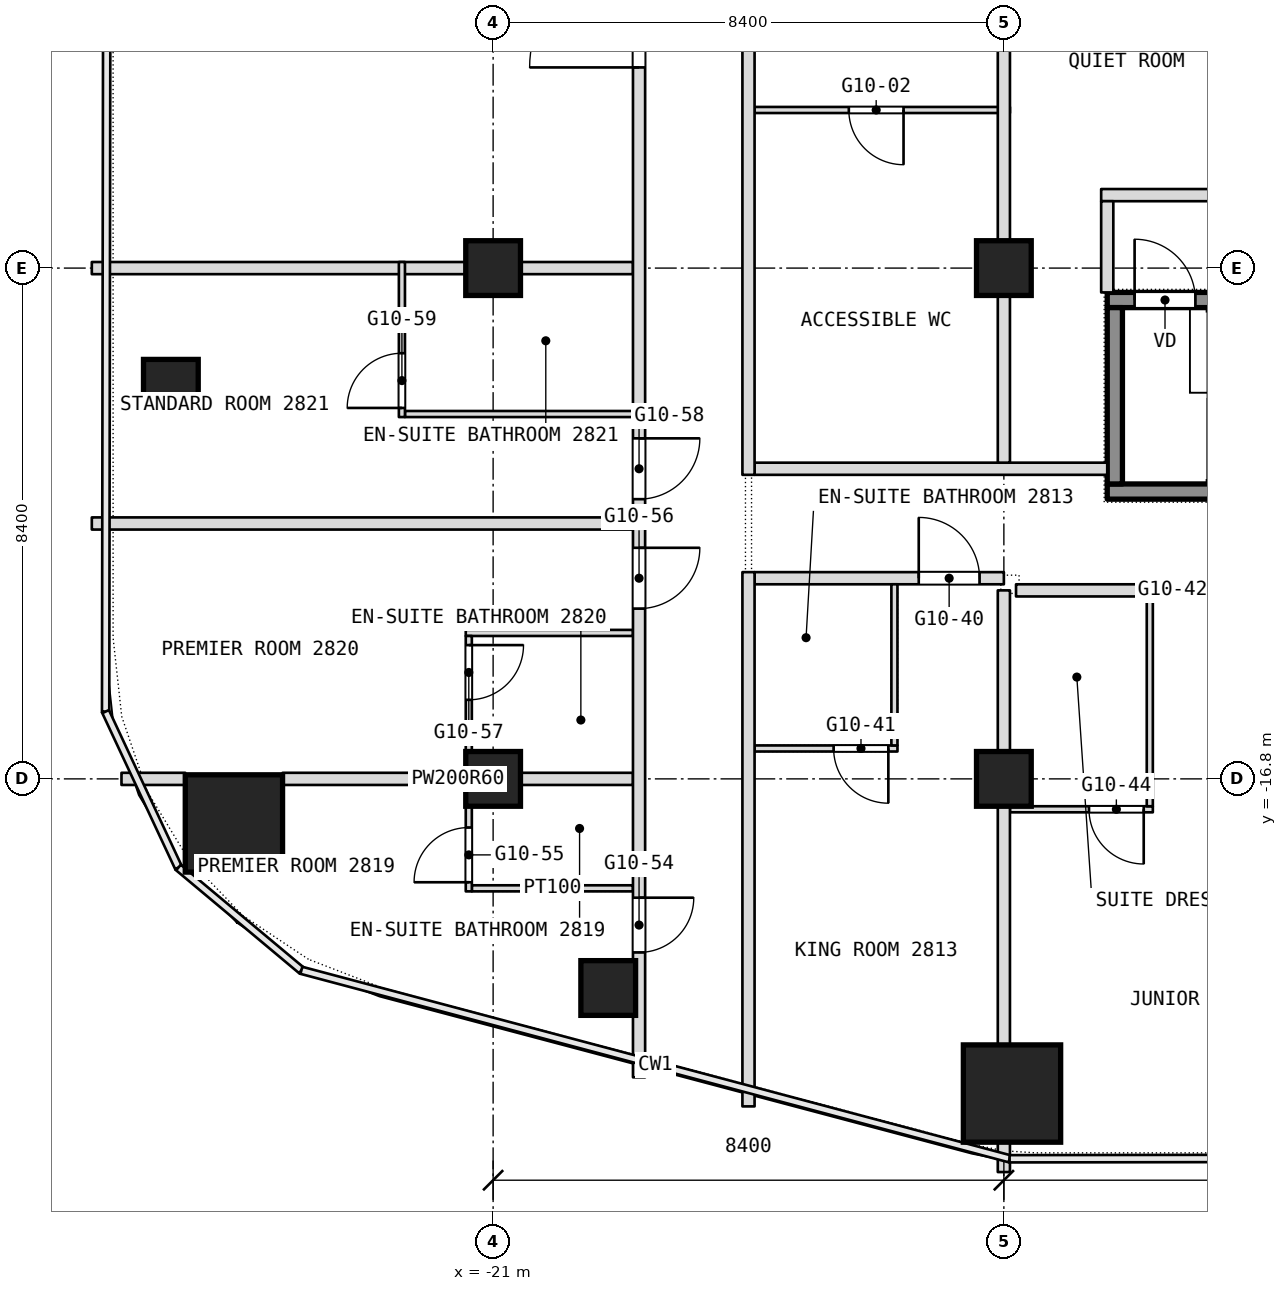
"""IFC4 building model, lengths in metres.
Left out: names, types, materials, properties, quantities, classifications, styles, units other than length and angle.
Written with IfcOpenShell. Run it as: python <this file> out.ifc"""

import sys

from ifc_helpers import new_model, si_unit, direction, frame, frame_2d, origin, origin_2d, place, context, subcontext, project, spatial, rectangle, extrude, element, fill, save


model = new_model("IFC4")
c1 = context("Model", 3, precision=1e-05, world=origin(), true_north=direction((0.0, 1.0)))
c2 = subcontext(c1, "Body", "Model", "MODEL_VIEW")
j1 = project(units=[si_unit("LENGTHUNIT", "METRE"), si_unit("PLANEANGLEUNIT", "RADIAN")], contexts=[c1])
p1 = place(None, origin())
s1 = spatial("IfcSite", under=j1, at=p1, CompositionType="ELEMENT")
p2 = place(p1, origin())
s2 = spatial("IfcBuilding", under=s1, at=p2, CompositionType="ELEMENT")
p3 = place(p2, frame((0.0, 0.0, 126.5)))
s3 = spatial("IfcBuildingStorey", under=s2, at=p3, CompositionType="ELEMENT", Elevation=126.5)
for number, where, z_axis, x_axis in (
    (1, (-25.263, -17.533, 0.0), (0.0, 0.0, 1.0), (1.0, 0.0, 0.0)),
    (2, (-12.466, -21.975, 0.0), (0.0, 0.0, 1.0), (1.0, 0.0, 0.0)),
):
    element("IfcColumn", number, at=place(p3, frame(where, z_axis=z_axis, x_axis=x_axis)), inside=s3, PredefinedType="COLUMN", context=c2, shape_type="SweptSolid", body=[
        extrude(rectangle(XDim=1.6, YDim=1.6, at=origin_2d()), origin(), (0.0, 0.0, 1.0), 3.6),
    ])
for number, where, z_axis, x_axis in (
    (3, (-21.0, -16.8, 0.0), (0.0, 0.0, 1.0), (1.0, 0.0, 0.0)),
    (4, (-21.0, -8.4, 0.0), (0.0, 0.0, 1.0), (1.0, 0.0, 0.0)),
    (5, (-12.6, -16.8, 0.0), (0.0, 0.0, 1.0), (1.0, 0.0, 0.0)),
    (6, (-12.6, -8.4, 0.0), (0.0, 0.0, 1.0), (1.0, 0.0, 0.0)),
    (7, (-26.3, -10.352, 0.0), (0.0, 0.0, 1.0), (1.0, 0.0, 0.0)),
    (8, (-19.107, -20.239, 0.0), (0.0, 0.0, 1.0), (1.0, 0.0, 0.0)),
):
    element("IfcColumn", number, at=place(p3, frame(where, z_axis=z_axis, x_axis=x_axis)), inside=s3, PredefinedType="COLUMN", context=c2, shape_type="SweptSolid", body=[
        extrude(rectangle(XDim=0.9, YDim=0.9, at=origin_2d()), origin(), (0.0, 0.0, 1.0), 3.6),
    ])
p4 = place(p3, frame((-21.35, -18.6, 0.0), z_axis=(0.0, 0.0, 1.0), x_axis=(1.0, 0.0, 0.0)))
e9 = element("IfcWall", 9, at=p4, inside=s3, PredefinedType="PARTITIONING", context=c2, shape_type="SweptSolid", body=[
    extrude(rectangle(XDim=2.65, YDim=0.1, at=frame_2d((1.325, 0.0))), origin(), (0.0, 0.0, 1.0), 3.34),
])
p5 = place(p3, frame((-12.5, -17.3, 0.0), z_axis=(0.0, 0.0, 1.0), x_axis=(1.0, 0.0, 0.0)))
e10 = element("IfcWall", 10, at=p5, inside=s3, PredefinedType="PARTITIONING", context=c2, shape_type="SweptSolid", body=[
    extrude(rectangle(XDim=2.35, YDim=0.1, at=frame_2d((1.175, 0.0))), origin(), (0.0, 0.0, 1.0), 3.34),
])
p6 = place(p5, frame((1.3, 0.0, 0.0)))
e11 = element("IfcOpeningElement", 11, at=p6, cuts=e10, PredefinedType="OPENING", context=c2, shape_type="SweptSolid", body=[
    extrude(rectangle(XDim=0.9, YDim=2.1, at=frame_2d((0.45, 1.05))), frame((0.0, 0.05, 0.0), z_axis=(0.0, -1.0, 0.0), x_axis=(1.0, 0.0, 0.0)), (0.0, 0.0, 1.0), 0.1),
])
p7 = place(p3, frame((-27.112, -16.8, 0.0), z_axis=(0.0, 0.0, 1.0), x_axis=(1.0, 0.0, 0.0)))
e12 = element("IfcWall", 12, at=p7, inside=s3, PredefinedType="PARTITIONING", context=c2, shape_type="SweptSolid", body=[
    extrude(rectangle(XDim=1.049, YDim=0.2, at=frame_2d((0.524, 0.0))), origin(), (0.0, 0.0, 1.0), 3.34),
])
p8 = place(p3, frame((-24.463, -16.8, 0.0), z_axis=(0.0, 0.0, 1.0), x_axis=(1.0, 0.0, 0.0)))
e13 = element("IfcWall", 13, at=p8, inside=s3, PredefinedType="PARTITIONING", context=c2, shape_type="SweptSolid", body=[
    extrude(rectangle(XDim=5.763, YDim=0.2, at=frame_2d((2.881, 0.0))), origin(), (0.0, 0.0, 1.0), 2.89),
])
p9 = place(p3, frame((-16.7, -16.3, 0.0), z_axis=(0.0, 0.0, 1.0), x_axis=(1.0, 0.0, 0.0)))
e14 = element("IfcWall", 14, at=p9, inside=s3, PredefinedType="PARTITIONING", context=c2, shape_type="SweptSolid", body=[
    extrude(rectangle(XDim=2.35, YDim=0.1, at=frame_2d((1.175, 0.0))), origin(), (0.0, 0.0, 1.0), 3.34),
])
p10 = place(p9, frame((1.3, 0.0, 0.0)))
e15 = element("IfcOpeningElement", 15, at=p10, cuts=e14, PredefinedType="OPENING", context=c2, shape_type="SweptSolid", body=[
    extrude(rectangle(XDim=0.9, YDim=2.1, at=frame_2d((0.45, 1.05))), frame((0.0, 0.05, 0.0), z_axis=(0.0, -1.0, 0.0), x_axis=(1.0, 0.0, 0.0)), (0.0, 0.0, 1.0), 0.1),
])
p11 = place(p3, frame((-21.45, -14.4, 0.0), z_axis=(0.0, 0.0, 1.0), x_axis=(1.0, 0.0, 0.0)))
e16 = element("IfcWall", 16, at=p11, inside=s3, PredefinedType="PARTITIONING", context=c2, shape_type="SweptSolid", body=[
    extrude(rectangle(XDim=2.75, YDim=0.1, at=frame_2d((1.375, 0.0))), origin(), (0.0, 0.0, 1.0), 3.34),
])
p12 = place(p3, frame((-12.4, -13.7, 0.0), z_axis=(0.0, 0.0, 1.0), x_axis=(1.0, 0.0, 0.0)))
e17 = element("IfcWall", 17, at=p12, inside=s3, PredefinedType="PARTITIONING", context=c2, shape_type="SweptSolid", body=[
    extrude(rectangle(XDim=9.2, YDim=0.2, at=frame_2d((4.6, 0.0))), origin(), (0.0, 0.0, 1.0), 3.34),
])
p13 = place(p12, frame((3.4, 0.0, 0.0)))
e18 = element("IfcOpeningElement", 18, at=p13, cuts=e17, PredefinedType="OPENING", context=c2, shape_type="SweptSolid", body=[
    extrude(rectangle(XDim=1.1, YDim=2.1, at=frame_2d((0.55, 1.05))), frame((0.0, 0.1, 0.0), z_axis=(0.0, -1.0, 0.0), x_axis=(1.0, 0.0, 0.0)), (0.0, 0.0, 1.0), 0.2),
])
p14 = place(p3, frame((-16.7, -13.5, 0.0), z_axis=(0.0, 0.0, 1.0), x_axis=(1.0, 0.0, 0.0)))
e19 = element("IfcWall", 19, at=p14, inside=s3, PredefinedType="PARTITIONING", context=c2, shape_type="SweptSolid", body=[
    extrude(rectangle(XDim=4.1, YDim=0.2, at=frame_2d((2.05, 0.0))), origin(), (0.0, 0.0, 1.0), 3.34),
])
p15 = place(p14, frame((2.7, 0.0, 0.0)))
e20 = element("IfcOpeningElement", 20, at=p15, cuts=e19, PredefinedType="OPENING", context=c2, shape_type="SweptSolid", body=[
    extrude(rectangle(XDim=1.0, YDim=2.1, at=frame_2d((0.5, 1.05))), frame((0.0, 0.1, 0.0), z_axis=(0.0, -1.0, 0.0), x_axis=(1.0, 0.0, 0.0)), (0.0, 0.0, 1.0), 0.2),
])
p16 = place(p3, frame((-27.6, -12.6, 0.0), z_axis=(0.0, 0.0, 1.0), x_axis=(1.0, 0.0, 0.0)))
e21 = element("IfcWall", 21, at=p16, inside=s3, PredefinedType="PARTITIONING", context=c2, shape_type="SweptSolid", body=[
    extrude(rectangle(XDim=8.9, YDim=0.2, at=frame_2d((4.45, 0.0))), origin(), (0.0, 0.0, 1.0), 3.34),
])
p17 = place(p3, frame((-16.7, -11.7, 0.0), z_axis=(0.0, 0.0, 1.0), x_axis=(1.0, 0.0, 0.0)))
e22 = element("IfcWall", 22, at=p17, inside=s3, PredefinedType="PARTITIONING", context=c2, shape_type="SweptSolid", body=[
    extrude(rectangle(XDim=5.8, YDim=0.2, at=frame_2d((2.9, 0.0))), origin(), (0.0, 0.0, 1.0), 3.34),
])
p18 = place(p3, frame((-22.45, -10.8, 0.0), z_axis=(0.0, 0.0, 1.0), x_axis=(1.0, 0.0, 0.0)))
e23 = element("IfcWall", 23, at=p18, inside=s3, PredefinedType="PARTITIONING", context=c2, shape_type="SweptSolid", body=[
    extrude(rectangle(XDim=3.75, YDim=0.1, at=frame_2d((1.875, 0.0))), origin(), (0.0, 0.0, 1.0), 3.34),
])
p19 = place(p3, frame((-27.6, -8.4, 0.0), z_axis=(0.0, 0.0, 1.0), x_axis=(1.0, 0.0, 0.0)))
e24 = element("IfcWall", 24, at=p19, inside=s3, PredefinedType="PARTITIONING", context=c2, shape_type="SweptSolid", body=[
    extrude(rectangle(XDim=8.9, YDim=0.2, at=frame_2d((4.45, 0.0))), origin(), (0.0, 0.0, 1.0), 2.89),
])
p20 = place(p3, frame((-11.0, -7.2, 0.0), z_axis=(0.0, 0.0, 1.0), x_axis=(1.0, 0.0, 0.0)))
e25 = element("IfcWall", 25, at=p20, inside=s3, PredefinedType="PARTITIONING", context=c2, shape_type="SweptSolid", body=[
    extrude(rectangle(XDim=2.3, YDim=0.2, at=frame_2d((1.15, 0.0))), origin(), (0.0, 0.0, 1.0), 3.34),
])
p21 = place(p3, frame((-16.7, -5.8, 0.0), z_axis=(0.0, 0.0, 1.0), x_axis=(1.0, 0.0, 0.0)))
e26 = element("IfcWall", 26, at=p21, inside=s3, PredefinedType="PARTITIONING", context=c2, shape_type="SweptSolid", body=[
    extrude(rectangle(XDim=4.2, YDim=0.1, at=frame_2d((2.1, 0.0))), origin(), (0.0, 0.0, 1.0), 3.34),
])
p22 = place(p21, frame((1.55, 0.0, 0.0)))
e27 = element("IfcOpeningElement", 27, at=p22, cuts=e26, PredefinedType="OPENING", context=c2, shape_type="SweptSolid", body=[
    extrude(rectangle(XDim=0.9, YDim=2.1, at=frame_2d((0.45, 1.05))), frame((0.0, 0.05, 0.0), z_axis=(0.0, -1.0, 0.0), x_axis=(1.0, 0.0, 0.0)), (0.0, 0.0, 1.0), 0.1),
])
p23 = place(p3, frame((-10.2, -17.25, 0.0), z_axis=(0.0, 0.0, 1.0), x_axis=(0.0, 1.0, 0.0)))
e28 = element("IfcWall", 28, at=p23, inside=s3, PredefinedType="PARTITIONING", context=c2, shape_type="SweptSolid", body=[
    extrude(rectangle(XDim=3.45, YDim=0.1, at=frame_2d((1.725, 0.0))), origin(), (0.0, 0.0, 1.0), 3.34),
])
p24 = place(p3, frame((-10.9, -8.8, 0.0), z_axis=(0.0, 0.0, 1.0), x_axis=(0.0, 1.0, 0.0)))
e29 = element("IfcWall", 29, at=p24, inside=s3, PredefinedType="PARTITIONING", context=c2, shape_type="SweptSolid", body=[
    extrude(rectangle(XDim=1.5, YDim=0.2, at=frame_2d((0.75, 0.0))), origin(), (0.0, 0.0, 1.0), 3.34),
])
p25 = place(p3, frame((-12.6, -23.266, 0.0), z_axis=(0.0, 0.0, 1.0), x_axis=(0.0, 1.0, 0.0)))
e30 = element("IfcWall", 30, at=p25, inside=s3, PredefinedType="PARTITIONING", context=c2, shape_type="SweptSolid", body=[
    extrude(rectangle(XDim=0.491, YDim=0.2, at=frame_2d((0.246, 0.0))), origin(), (0.0, 0.0, 1.0), 3.34),
])
p26 = place(p3, frame((-12.6, -21.175, 0.0), z_axis=(0.0, 0.0, 1.0), x_axis=(0.0, 1.0, 0.0)))
e31 = element("IfcWall", 31, at=p26, inside=s3, PredefinedType="PARTITIONING", context=c2, shape_type="SweptSolid", body=[
    extrude(rectangle(XDim=7.475, YDim=0.2, at=frame_2d((3.738, 0.0))), origin(), (0.0, 0.0, 1.0), 3.34),
])
p27 = place(p3, frame((-12.6, -11.6, 0.0), z_axis=(0.0, 0.0, 1.0), x_axis=(0.0, 1.0, 0.0)))
e32 = element("IfcWall", 32, at=p27, inside=s3, PredefinedType="PARTITIONING", context=c2, shape_type="SweptSolid", body=[
    extrude(rectangle(XDim=9.7, YDim=0.2, at=frame_2d((4.85, 0.0))), origin(), (0.0, 0.0, 1.0), 3.34),
])
p28 = place(p3, frame((-14.4, -16.25, 0.0), z_axis=(0.0, 0.0, 1.0), x_axis=(0.0, 1.0, 0.0)))
e33 = element("IfcWall", 33, at=p28, inside=s3, PredefinedType="PARTITIONING", context=c2, shape_type="SweptSolid", body=[
    extrude(rectangle(XDim=2.65, YDim=0.1, at=frame_2d((1.325, 0.0))), origin(), (0.0, 0.0, 1.0), 3.34),
])
p29 = place(p3, frame((-16.8, -22.186, 0.0), z_axis=(0.0, 0.0, 1.0), x_axis=(0.0, 1.0, 0.0)))
e34 = element("IfcWall", 34, at=p29, inside=s3, PredefinedType="PARTITIONING", context=c2, shape_type="SweptSolid", body=[
    extrude(rectangle(XDim=8.786, YDim=0.2, at=frame_2d((4.393, 0.0))), origin(), (0.0, 0.0, 1.0), 3.34),
])
p30 = place(p3, frame((-16.8, -11.8, 0.0), z_axis=(0.0, 0.0, 1.0), x_axis=(0.0, 1.0, 0.0)))
e35 = element("IfcWall", 35, at=p30, inside=s3, PredefinedType="PARTITIONING", context=c2, shape_type="SweptSolid", body=[
    extrude(rectangle(XDim=9.9, YDim=0.2, at=frame_2d((4.95, 0.0))), origin(), (0.0, 0.0, 1.0), 3.34),
])
p31 = place(p3, frame((-18.6, -21.708, 0.0), z_axis=(0.0, 0.0, 1.0), x_axis=(0.0, 1.0, 0.0)))
e36 = element("IfcWall", 36, at=p31, inside=s3, PredefinedType="PARTITIONING", context=c2, shape_type="SweptSolid", body=[
    extrude(rectangle(XDim=28.608, YDim=0.2, at=frame_2d((14.304, 0.0))), origin(), (0.0, 0.0, 1.0), 3.34),
])
p32 = place(p31, frame((2.054, 0.0, 0.0)))
e37 = element("IfcOpeningElement", 37, at=p32, cuts=e36, PredefinedType="OPENING", context=c2, shape_type="SweptSolid", body=[
    extrude(rectangle(XDim=0.9, YDim=2.1, at=frame_2d((0.45, 1.05))), frame((0.0, 0.1, 0.0), z_axis=(0.0, -1.0, 0.0), x_axis=(1.0, 0.0, 0.0)), (0.0, 0.0, 1.0), 0.2),
])
p33 = place(p31, frame((7.708, 0.0, 0.0)))
e38 = element("IfcOpeningElement", 38, at=p33, cuts=e36, PredefinedType="OPENING", context=c2, shape_type="SweptSolid", body=[
    extrude(rectangle(XDim=1.0, YDim=2.1, at=frame_2d((0.5, 1.05))), frame((0.0, 0.1, 0.0), z_axis=(0.0, -1.0, 0.0), x_axis=(1.0, 0.0, 0.0)), (0.0, 0.0, 1.0), 0.2),
])
p34 = place(p31, frame((9.508, 0.0, 0.0)))
e39 = element("IfcOpeningElement", 39, at=p34, cuts=e36, PredefinedType="OPENING", context=c2, shape_type="SweptSolid", body=[
    extrude(rectangle(XDim=1.0, YDim=2.1, at=frame_2d((0.5, 1.05))), frame((0.0, 0.1, 0.0), z_axis=(0.0, -1.0, 0.0), x_axis=(1.0, 0.0, 0.0)), (0.0, 0.0, 1.0), 0.2),
])
p35 = place(p31, frame((16.608, 0.0, 0.0)))
e40 = element("IfcOpeningElement", 40, at=p35, cuts=e36, PredefinedType="OPENING", context=c2, shape_type="SweptSolid", body=[
    extrude(rectangle(XDim=1.8, YDim=2.1, at=frame_2d((0.9, 1.05))), frame((0.0, 0.1, 0.0), z_axis=(0.0, -1.0, 0.0), x_axis=(1.0, 0.0, 0.0)), (0.0, 0.0, 1.0), 0.2),
])
p36 = place(p3, frame((-21.4, -18.65, 0.0), z_axis=(0.0, 0.0, 1.0), x_axis=(0.0, 1.0, 0.0)))
e41 = element("IfcWall", 41, at=p36, inside=s3, PredefinedType="PARTITIONING", context=c2, shape_type="SweptSolid", body=[
    extrude(rectangle(XDim=4.2, YDim=0.1, at=frame_2d((2.1, 0.0))), origin(), (0.0, 0.0, 1.0), 3.34),
])
p37 = place(p36, frame((0.15, 0.0, 0.0)))
e42 = element("IfcOpeningElement", 42, at=p37, cuts=e41, PredefinedType="OPENING", context=c2, shape_type="SweptSolid", body=[
    extrude(rectangle(XDim=0.9, YDim=2.1, at=frame_2d((0.45, 1.05))), frame((0.0, 0.05, 0.0), z_axis=(0.0, -1.0, 0.0), x_axis=(1.0, 0.0, 0.0)), (0.0, 0.0, 1.0), 0.1),
])
p38 = place(p36, frame((3.15, 0.0, 0.0)))
e43 = element("IfcOpeningElement", 43, at=p38, cuts=e41, PredefinedType="OPENING", context=c2, shape_type="SweptSolid", body=[
    extrude(rectangle(XDim=0.9, YDim=2.1, at=frame_2d((0.45, 1.05))), frame((0.0, 0.05, 0.0), z_axis=(0.0, -1.0, 0.0), x_axis=(1.0, 0.0, 0.0)), (0.0, 0.0, 1.0), 0.1),
])
p39 = place(p3, frame((-22.5, -10.85, 0.0), z_axis=(0.0, 0.0, 1.0), x_axis=(0.0, 1.0, 0.0)))
e44 = element("IfcWall", 44, at=p39, inside=s3, PredefinedType="PARTITIONING", context=c2, shape_type="SweptSolid", body=[
    extrude(rectangle(XDim=2.55, YDim=0.1, at=frame_2d((1.275, 0.0))), origin(), (0.0, 0.0, 1.0), 3.34),
])
p40 = place(p39, frame((0.15, 0.0, 0.0)))
e45 = element("IfcOpeningElement", 45, at=p40, cuts=e44, PredefinedType="OPENING", context=c2, shape_type="SweptSolid", body=[
    extrude(rectangle(XDim=0.9, YDim=2.1, at=frame_2d((0.45, 1.05))), frame((0.0, 0.05, 0.0), z_axis=(0.0, -1.0, 0.0), x_axis=(1.0, 0.0, 0.0)), (0.0, 0.0, 1.0), 0.1),
])
p41 = place(p3, frame((-10.9, -12.075, 0.1), z_axis=(0.0, 0.0, 1.0), x_axis=(1.0, 0.0, 0.0)))
e46 = element("IfcWall", 46, at=p41, inside=s3, PredefinedType="SHEAR", context=c2, shape_type="SweptSolid", body=[
    extrude(rectangle(XDim=6.2, YDim=0.25, at=frame_2d((3.1, 0.0))), origin(), (0.0, 0.0, 1.0), 3.6),
])
p42 = place(p3, frame((-10.9, -8.925, 0.1), z_axis=(0.0, 0.0, 1.0), x_axis=(1.0, 0.0, 0.0)))
e47 = element("IfcWall", 47, at=p42, inside=s3, PredefinedType="SHEAR", context=c2, shape_type="SweptSolid", body=[
    extrude(rectangle(XDim=6.2, YDim=0.25, at=frame_2d((3.1, 0.0))), origin(), (0.0, 0.0, 1.0), 3.6),
])
p43 = place(p42, frame((0.45, 0.0, 0.0)))
e48 = element("IfcOpeningElement", 48, at=p43, cuts=e47, PredefinedType="OPENING", context=c2, shape_type="SweptSolid", body=[
    extrude(rectangle(XDim=1.0, YDim=2.1, at=frame_2d((0.5, 1.05))), frame((0.0, 0.125, 0.0), z_axis=(0.0, -1.0, 0.0), x_axis=(1.0, 0.0, 0.0)), (0.0, 0.0, 1.0), 0.25),
])
p44 = place(p3, frame((-10.775, -11.95, 0.1), z_axis=(0.0, 0.0, 1.0), x_axis=(0.0, 1.0, 0.0)))
e49 = element("IfcWall", 49, at=p44, inside=s3, PredefinedType="SHEAR", context=c2, shape_type="SweptSolid", body=[
    extrude(rectangle(XDim=2.9, YDim=0.25, at=frame_2d((1.45, 0.0))), origin(), (0.0, 0.0, 1.0), 3.6),
])
p45 = place(p6, origin())
e50 = element("IfcDoor", 50, at=p45, inside=s3, OperationType="SINGLE_SWING_RIGHT", PredefinedType="DOOR", context=c2, shape_type="SweptSolid", body=[
    extrude(rectangle(XDim=0.9, YDim=2.1, at=frame_2d((0.45, 1.05))), frame((0.0, 0.025, 0.0), z_axis=(0.0, -1.0, 0.0), x_axis=(1.0, 0.0, 0.0)), (0.0, 0.0, 1.0), 0.05),
])
fill(e11, e50)
p46 = place(p10, origin())
e51 = element("IfcDoor", 51, at=p46, inside=s3, OperationType="SINGLE_SWING_RIGHT", PredefinedType="DOOR", context=c2, shape_type="SweptSolid", body=[
    extrude(rectangle(XDim=0.9, YDim=2.1, at=frame_2d((0.45, 1.05))), frame((0.0, 0.025, 0.0), z_axis=(0.0, -1.0, 0.0), x_axis=(1.0, 0.0, 0.0)), (0.0, 0.0, 1.0), 0.05),
])
fill(e15, e51)
p47 = place(p15, origin())
e52 = element("IfcDoor", 52, at=p47, inside=s3, OperationType="SINGLE_SWING_RIGHT", PredefinedType="DOOR", context=c2, shape_type="SweptSolid", body=[
    extrude(rectangle(XDim=1.0, YDim=2.1, at=frame_2d((0.5, 1.05))), frame((0.0, 0.025, 0.0), z_axis=(0.0, -1.0, 0.0), x_axis=(1.0, 0.0, 0.0)), (0.0, 0.0, 1.0), 0.05),
])
fill(e20, e52)
p48 = place(p22, origin())
e53 = element("IfcDoor", 53, at=p48, inside=s3, OperationType="SINGLE_SWING_RIGHT", PredefinedType="DOOR", context=c2, shape_type="SweptSolid", body=[
    extrude(rectangle(XDim=0.9, YDim=2.1, at=frame_2d((0.45, 1.05))), frame((0.0, 0.025, 0.0), z_axis=(0.0, -1.0, 0.0), x_axis=(1.0, 0.0, 0.0)), (0.0, 0.0, 1.0), 0.05),
])
fill(e27, e53)
p49 = place(p32, origin())
e54 = element("IfcDoor", 54, at=p49, inside=s3, OperationType="SINGLE_SWING_LEFT", PredefinedType="DOOR", context=c2, shape_type="SweptSolid", body=[
    extrude(rectangle(XDim=0.9, YDim=2.1, at=frame_2d((0.45, 1.05))), frame((0.0, 0.025, 0.0), z_axis=(0.0, -1.0, 0.0), x_axis=(1.0, 0.0, 0.0)), (0.0, 0.0, 1.0), 0.05),
])
fill(e37, e54)
p50 = place(p33, origin())
e55 = element("IfcDoor", 55, at=p50, inside=s3, OperationType="SINGLE_SWING_LEFT", PredefinedType="DOOR", context=c2, shape_type="SweptSolid", body=[
    extrude(rectangle(XDim=1.0, YDim=2.1, at=frame_2d((0.5, 1.05))), frame((0.0, 0.025, 0.0), z_axis=(0.0, -1.0, 0.0), x_axis=(1.0, 0.0, 0.0)), (0.0, 0.0, 1.0), 0.05),
])
fill(e38, e55)
p51 = place(p34, origin())
e56 = element("IfcDoor", 56, at=p51, inside=s3, OperationType="SINGLE_SWING_LEFT", PredefinedType="DOOR", context=c2, shape_type="SweptSolid", body=[
    extrude(rectangle(XDim=1.0, YDim=2.1, at=frame_2d((0.5, 1.05))), frame((0.0, 0.025, 0.0), z_axis=(0.0, -1.0, 0.0), x_axis=(1.0, 0.0, 0.0)), (0.0, 0.0, 1.0), 0.05),
])
fill(e39, e56)
p52 = place(p35, origin())
e57 = element("IfcDoor", 57, at=p52, inside=s3, OperationType="DOUBLE_DOOR_SINGLE_SWING", PredefinedType="DOOR", context=c2, shape_type="SweptSolid", body=[
    extrude(rectangle(XDim=1.8, YDim=2.1, at=frame_2d((0.9, 1.05))), frame((0.0, 0.025, 0.0), z_axis=(0.0, -1.0, 0.0), x_axis=(1.0, 0.0, 0.0)), (0.0, 0.0, 1.0), 0.05),
])
fill(e40, e57)
p53 = place(p37, origin())
e58 = element("IfcDoor", 58, at=p53, inside=s3, OperationType="SINGLE_SWING_RIGHT", PredefinedType="DOOR", context=c2, shape_type="SweptSolid", body=[
    extrude(rectangle(XDim=0.9, YDim=2.1, at=frame_2d((0.45, 1.05))), frame((0.0, 0.025, 0.0), z_axis=(0.0, -1.0, 0.0), x_axis=(1.0, 0.0, 0.0)), (0.0, 0.0, 1.0), 0.05),
])
fill(e42, e58)
p54 = place(p38, origin())
e59 = element("IfcDoor", 59, at=p54, inside=s3, OperationType="SINGLE_SWING_LEFT", PredefinedType="DOOR", context=c2, shape_type="SweptSolid", body=[
    extrude(rectangle(XDim=0.9, YDim=2.1, at=frame_2d((0.45, 1.05))), frame((0.0, 0.025, 0.0), z_axis=(0.0, -1.0, 0.0), x_axis=(1.0, 0.0, 0.0)), (0.0, 0.0, 1.0), 0.05),
])
fill(e43, e59)
p55 = place(p40, origin())
e60 = element("IfcDoor", 60, at=p55, inside=s3, OperationType="SINGLE_SWING_RIGHT", PredefinedType="DOOR", context=c2, shape_type="SweptSolid", body=[
    extrude(rectangle(XDim=0.9, YDim=2.1, at=frame_2d((0.45, 1.05))), frame((0.0, 0.025, 0.0), z_axis=(0.0, -1.0, 0.0), x_axis=(1.0, 0.0, 0.0)), (0.0, 0.0, 1.0), 0.05),
])
fill(e45, e60)
p56 = place(p43, origin())
e61 = element("IfcDoor", 61, at=p56, inside=s3, OperationType="SINGLE_SWING_LEFT", PredefinedType="DOOR", context=c2, shape_type="SweptSolid", body=[
    extrude(rectangle(XDim=1.0, YDim=2.1, at=frame_2d((0.5, 1.05))), frame((0.0, 0.025, 0.0), z_axis=(0.0, -1.0, 0.0), x_axis=(1.0, 0.0, 0.0)), (0.0, 0.0, 1.0), 0.05),
])
fill(e48, e61)
save(model, sys.argv[1])
